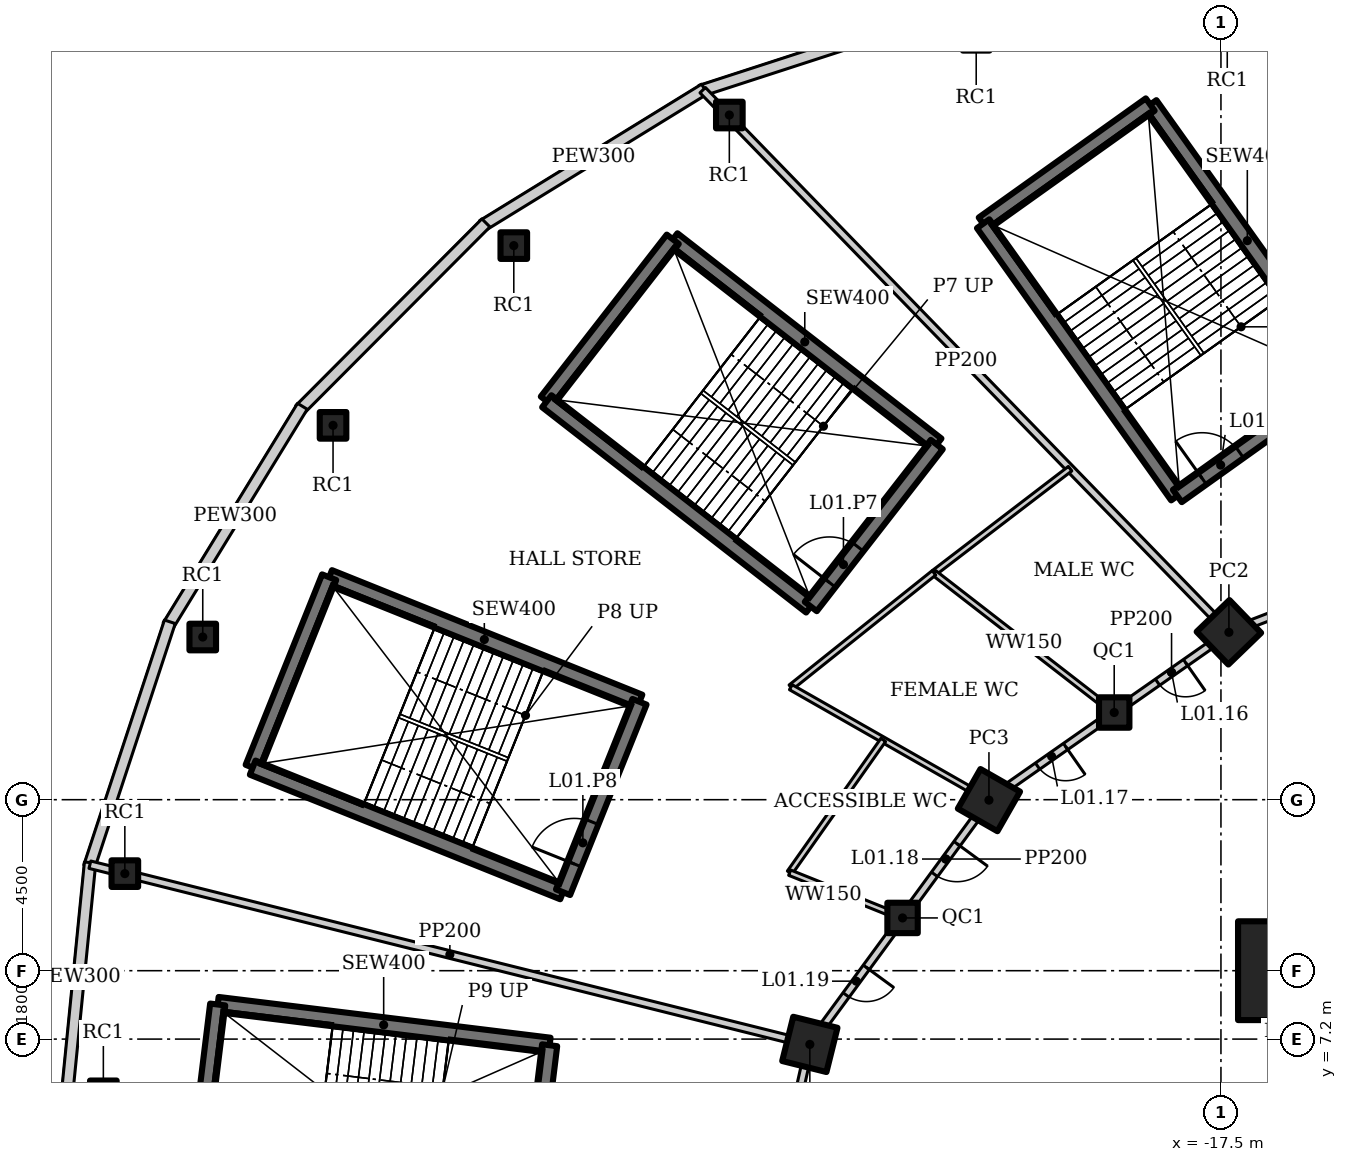
"""IFC4 building model, lengths in metres.
Left out: names, types, materials, properties, quantities, classifications, styles, units other than length and angle.
Written with IfcOpenShell. Run it as: python <this file> out.ifc"""

import sys

from ifc_helpers import new_model, si_unit, direction, frame, frame_2d, origin, origin_2d, place, context, subcontext, project, spatial, rectangle, hollow_rectangle, extrude, element, fill, save


model = new_model("IFC4")
c1 = context("Model", 3, precision=1e-05, world=origin(), true_north=direction((0.0, 1.0)))
c2 = subcontext(c1, "Body", "Model", "MODEL_VIEW")
j1 = project(units=[si_unit("LENGTHUNIT", "METRE"), si_unit("PLANEANGLEUNIT", "RADIAN")], contexts=[c1])
p1 = place(None, origin())
s1 = spatial("IfcSite", under=j1, at=p1, CompositionType="ELEMENT")
p2 = place(p1, origin())
s2 = spatial("IfcBuilding", under=s1, at=p2, CompositionType="ELEMENT")
p3 = place(p2, frame((0.0, 0.0, 6.5)))
s3 = spatial("IfcBuildingStorey", under=s2, at=p3, CompositionType="ELEMENT", Elevation=6.5)
p4 = place(p3, frame((-15.75, 9.0, 0.0), z_axis=(0.0, 0.0, 1.0), x_axis=(1.0, 0.0, 0.0)))
e1 = element("IfcColumn", 1, at=p4, inside=s3, PredefinedType="COLUMN", context=c2, shape_type="SweptSolid", body=[
    extrude(hollow_rectangle(XDim=2.6, YDim=2.6, WallThickness=0.13, at=origin_2d()), origin(), (0.0, 0.0, 1.0), 8.0),
])
p5 = place(p3, frame((-17.291, 17.905, 0.0), z_axis=(0.0, 0.0, 1.0), x_axis=(0.719339800339, 0.694658370459, 0.0)))
e2 = element("IfcColumn", 2, at=p5, inside=s3, PredefinedType="COLUMN", context=c2, shape_type="SweptSolid", body=[
    extrude(hollow_rectangle(XDim=1.2, YDim=1.2, WallThickness=0.1, at=origin_2d()), origin(), (0.0, 0.0, 1.0), 8.0),
])
p6 = place(p3, frame((-23.605, 13.489, 0.0), z_axis=(0.0, 0.0, 1.0), x_axis=(0.496139221777, 0.86824298017, 0.0)))
e3 = element("IfcColumn", 3, at=p6, inside=s3, PredefinedType="COLUMN", context=c2, shape_type="SweptSolid", body=[
    extrude(hollow_rectangle(XDim=1.2, YDim=1.2, WallThickness=0.12, at=origin_2d()), origin(), (0.0, 0.0, 1.0), 8.0),
])
p7 = place(p3, frame((-28.318, 7.06, 0.0), z_axis=(0.0, 0.0, 1.0), x_axis=(0.2419218956, 0.970295726276, 0.0)))
e4 = element("IfcColumn", 4, at=p7, inside=s3, PredefinedType="COLUMN", context=c2, shape_type="SweptSolid", body=[
    extrude(hollow_rectangle(XDim=1.2, YDim=1.2, WallThickness=0.1, at=origin_2d()), origin(), (0.0, 0.0, 1.0), 8.0),
])
for number, where, z_axis, x_axis in (
    (5, (-20.309, 15.794, 0.0), (0.0, 0.0, 1.0), (1.0, 0.0, 0.0)),
    (6, (-25.878, 10.388, 0.0), (0.0, 0.0, 1.0), (1.0, 0.0, 0.0)),
):
    element("IfcColumn", number, at=place(p3, frame(where, z_axis=z_axis, x_axis=x_axis)), inside=s3, PredefinedType="COLUMN", context=c2, shape_type="SweptSolid", body=[
        extrude(hollow_rectangle(XDim=0.8, YDim=0.8, WallThickness=0.05, at=origin_2d()), origin(), (0.0, 0.0, 1.0), 8.0),
    ])
for number, where, z_axis, x_axis in (
    (7, (-36.108, 28.081, 0.0), (0.0, 0.0, 1.0), (1.0, 0.0, 0.0)),
    (8, (-44.292, 17.781, 0.0), (0.0, 0.0, 1.0), (1.0, 0.0, 0.0)),
    (9, (-46.908, 5.76, 0.0), (0.0, 0.0, 1.0), (1.0, 0.0, 0.0)),
    (10, (-30.436, 31.518, 0.0), (0.0, 0.0, 1.0), (1.0, 0.0, 0.0)),
    (11, (-40.864, 23.351, 0.0), (0.0, 0.0, 1.0), (1.0, 0.0, 0.0)),
    (12, (-46.343, 11.554, 0.0), (0.0, 0.0, 1.0), (1.0, 0.0, 0.0)),
):
    element("IfcColumn", number, at=place(p3, frame(where, z_axis=z_axis, x_axis=x_axis)), inside=s3, PredefinedType="COLUMN", context=c2, shape_type="SweptSolid", body=[
        extrude(hollow_rectangle(XDim=0.7, YDim=0.7, WallThickness=0.04, at=origin_2d()), origin(), (0.0, 0.0, 1.0), 8.0),
    ])
p8 = place(p3, frame((-24.495, 34.328, 0.0), z_axis=(0.0, 0.0, 1.0), x_axis=(-0.951140010357, -0.308759907853, 0.0)))
e13 = element("IfcWall", 13, at=p8, inside=s3, PredefinedType="SOLIDWALL", context=c2, shape_type="SweptSolid", body=[
    extrude(rectangle(XDim=7.041, YDim=0.3, at=frame_2d((3.521, 0.0))), origin(), (0.0, 0.0, 1.0), 7.8),
])
p9 = place(p3, frame((-31.088, 32.202, 0.0), z_axis=(0.0, 0.0, 1.0), x_axis=(-0.851808565246, -0.52385319334, 0.0)))
e14 = element("IfcWall", 14, at=p9, inside=s3, PredefinedType="SOLIDWALL", context=c2, shape_type="SweptSolid", body=[
    extrude(rectangle(XDim=6.861, YDim=0.3, at=frame_2d((3.43, 0.0))), origin(), (0.0, 0.0, 1.0), 7.8),
])
p10 = place(p3, frame((-36.842, 28.679, 0.0), z_axis=(0.0, 0.0, 1.0), x_axis=(-0.705874614645, -0.708336804352, 0.0)))
e15 = element("IfcWall", 15, at=p10, inside=s3, PredefinedType="SOLIDWALL", context=c2, shape_type="SweptSolid", body=[
    extrude(rectangle(XDim=6.941, YDim=0.3, at=frame_2d((3.47, 0.0))), origin(), (0.0, 0.0, 1.0), 7.8),
])
p11 = place(p3, frame((-41.67, 23.852, 0.0), z_axis=(0.0, 0.0, 1.0), x_axis=(-0.52225340952, -0.852790347181, 0.0)))
e16 = element("IfcWall", 16, at=p11, inside=s3, PredefinedType="SOLIDWALL", context=c2, shape_type="SweptSolid", body=[
    extrude(rectangle(XDim=6.771, YDim=0.3, at=frame_2d((3.385, 0.0))), origin(), (0.0, 0.0, 1.0), 7.8),
])
p12 = place(p3, frame((-45.158, 18.182, 0.0), z_axis=(0.0, 0.0, 1.0), x_axis=(-0.31263149373, -0.94987449125, 0.0)))
e17 = element("IfcWall", 17, at=p12, inside=s3, PredefinedType="SOLIDWALL", context=c2, shape_type="SweptSolid", body=[
    extrude(rectangle(XDim=6.786, YDim=0.3, at=frame_2d((3.393, 0.0))), origin(), (0.0, 0.0, 1.0), 7.8),
])
p13 = place(p3, frame((-47.257, 11.845, 0.0), z_axis=(0.0, 0.0, 1.0), x_axis=(-0.099051198898, -0.9950823383, 0.0)))
e18 = element("IfcWall", 18, at=p13, inside=s3, PredefinedType="SOLIDWALL", context=c2, shape_type="SweptSolid", body=[
    extrude(rectangle(XDim=6.036, YDim=0.3, at=frame_2d((3.018, 0.0))), origin(), (0.0, 0.0, 1.0), 7.8),
])
p14 = place(p3, frame((-13.745, 19.27, 0.0), z_axis=(0.0, 0.0, 1.0), x_axis=(-0.933224646415, -0.359293416754, 0.0)))
e19 = element("IfcWall", 19, at=p14, inside=s3, PredefinedType="SOLIDWALL", context=c2, shape_type="SweptSolid", body=[
    extrude(rectangle(XDim=3.799, YDim=0.2, at=frame_2d((1.899, 0.0))), origin(), (0.0, 0.0, 1.0), 7.274),
])
p15 = place(p3, frame((-17.291, 17.905, 0.0), z_axis=(0.0, 0.0, 1.0), x_axis=(-0.819409395821, -0.573208724672, 0.0)))
e20 = element("IfcWall", 20, at=p15, inside=s3, PredefinedType="SOLIDWALL", context=c2, shape_type="SweptSolid", body=[
    extrude(rectangle(XDim=3.683, YDim=0.2, at=frame_2d((1.841, 0.0))), origin(), (0.0, 0.0, 1.0), 7.396),
])
p16 = place(p15, frame((1.391, 0.0, 0.0)))
e21 = element("IfcOpeningElement", 21, at=p16, cuts=e20, PredefinedType="OPENING", context=c2, shape_type="SweptSolid", body=[
    extrude(rectangle(XDim=0.9, YDim=2.1, at=frame_2d((0.45, 1.05))), frame((0.0, 0.11, 0.0), z_axis=(0.0, -1.0, 0.0), x_axis=(1.0, 0.0, 0.0)), (0.0, 0.0, 1.0), 0.22),
])
p17 = place(p3, frame((-20.309, 15.794, 0.0), z_axis=(0.0, 0.0, 1.0), x_axis=(-0.819442856133, -0.573160889744, 0.0)))
e22 = element("IfcWall", 22, at=p17, inside=s3, PredefinedType="SOLIDWALL", context=c2, shape_type="SweptSolid", body=[
    extrude(rectangle(XDim=4.023, YDim=0.2, at=frame_2d((2.011, 0.0))), origin(), (0.0, 0.0, 1.0), 7.396),
])
p18 = place(p17, frame((1.561, 0.0, 0.0)))
e23 = element("IfcOpeningElement", 23, at=p18, cuts=e22, PredefinedType="OPENING", context=c2, shape_type="SweptSolid", body=[
    extrude(rectangle(XDim=0.9, YDim=2.1, at=frame_2d((0.45, 1.05))), frame((0.0, 0.11, 0.0), z_axis=(0.0, -1.0, 0.0), x_axis=(1.0, 0.0, 0.0)), (0.0, 0.0, 1.0), 0.22),
])
p19 = place(p3, frame((-23.605, 13.489, 0.0), z_axis=(0.0, 0.0, 1.0), x_axis=(-0.591286566758, -0.806461527893, 0.0)))
e24 = element("IfcWall", 24, at=p19, inside=s3, PredefinedType="SOLIDWALL", context=c2, shape_type="SweptSolid", body=[
    extrude(rectangle(XDim=3.844, YDim=0.2, at=frame_2d((1.922, 0.0))), origin(), (0.0, 0.0, 1.0), 7.396),
])
p20 = place(p19, frame((1.422, 0.0, 0.0)))
e25 = element("IfcOpeningElement", 25, at=p20, cuts=e24, PredefinedType="OPENING", context=c2, shape_type="SweptSolid", body=[
    extrude(rectangle(XDim=1.0, YDim=2.1, at=frame_2d((0.5, 1.05))), frame((0.0, 0.11, 0.0), z_axis=(0.0, -1.0, 0.0), x_axis=(1.0, 0.0, 0.0)), (0.0, 0.0, 1.0), 0.22),
])
p21 = place(p3, frame((-25.878, 10.388, 0.0), z_axis=(0.0, 0.0, 1.0), x_axis=(-0.591255937291, -0.806483984105, 0.0)))
e26 = element("IfcWall", 26, at=p21, inside=s3, PredefinedType="SOLIDWALL", context=c2, shape_type="SweptSolid", body=[
    extrude(rectangle(XDim=4.127, YDim=0.2, at=frame_2d((2.063, 0.0))), origin(), (0.0, 0.0, 1.0), 7.396),
])
p22 = place(p21, frame((1.613, 0.0, 0.0)))
e27 = element("IfcOpeningElement", 27, at=p22, cuts=e26, PredefinedType="OPENING", context=c2, shape_type="SweptSolid", body=[
    extrude(rectangle(XDim=0.9, YDim=2.1, at=frame_2d((0.45, 1.05))), frame((0.0, 0.11, 0.0), z_axis=(0.0, -1.0, 0.0), x_axis=(1.0, 0.0, 0.0)), (0.0, 0.0, 1.0), 0.22),
])
p23 = place(p3, frame((-28.318, 7.06, 0.0), z_axis=(0.0, 0.0, 1.0), x_axis=(-0.218673326171, -0.97579812278, 0.0)))
e28 = element("IfcWall", 28, at=p23, inside=s3, PredefinedType="SOLIDWALL", context=c2, shape_type="SweptSolid", body=[
    extrude(rectangle(XDim=3.574, YDim=0.2, at=frame_2d((1.787, 0.0))), origin(), (0.0, 0.0, 1.0), 7.396),
])
p24 = place(p3, frame((-17.291, 17.905, 0.0), z_axis=(0.0, 0.0, 1.0), x_axis=(-0.696460684513, 0.717594951855, 0.0)))
e29 = element("IfcWall", 29, at=p24, inside=s3, PredefinedType="SOLIDWALL", context=c2, shape_type="SweptSolid", body=[
    extrude(rectangle(XDim=19.881, YDim=0.2, at=frame_2d((9.94, 0.0))), origin(), (0.0, 0.0, 1.0), 6.3),
])
p25 = place(p3, frame((-28.318, 7.06, 0.0), z_axis=(0.0, 0.0, 1.0), x_axis=(-0.970227758662, 0.242194335859, 0.0)))
e30 = element("IfcWall", 30, at=p25, inside=s3, PredefinedType="SOLIDWALL", context=c2, shape_type="SweptSolid", body=[
    extrude(rectangle(XDim=19.526, YDim=0.2, at=frame_2d((9.763, 0.0))), origin(), (0.0, 0.0, 1.0), 6.3),
])
p26 = place(p3, frame((-21.469, 22.211, 0.0), z_axis=(0.0, 0.0, 1.0), x_axis=(-0.794122703503, -0.607757461313, 0.0)))
e31 = element("IfcWall", 31, at=p26, inside=s3, PredefinedType="SOLIDWALL", context=c2, shape_type="SweptSolid", body=[
    extrude(rectangle(XDim=4.51, YDim=0.15, at=frame_2d((2.255, 0.0))), origin(), (0.0, 0.0, 1.0), 7.8),
])
p27 = place(p3, frame((-20.309, 15.794, 0.0), z_axis=(0.0, 0.0, 1.0), x_axis=(-0.790437708207, 0.61254243073, 0.0)))
e32 = element("IfcWall", 32, at=p27, inside=s3, PredefinedType="SOLIDWALL", context=c2, shape_type="SweptSolid", body=[
    extrude(rectangle(XDim=6.0, YDim=0.15, at=frame_2d((3.0, 0.0))), origin(), (0.0, 0.0, 1.0), 7.8),
])
p28 = place(p3, frame((-25.051, 19.469, 0.0), z_axis=(0.0, 0.0, 1.0), x_axis=(-0.781204641684, -0.624275025779, 0.0)))
e33 = element("IfcWall", 33, at=p28, inside=s3, PredefinedType="SOLIDWALL", context=c2, shape_type="SweptSolid", body=[
    extrude(rectangle(XDim=4.821, YDim=0.15, at=frame_2d((2.411, 0.0))), origin(), (0.0, 0.0, 1.0), 7.8),
])
p29 = place(p3, frame((-23.605, 13.489, 0.0), z_axis=(0.0, 0.0, 1.0), x_axis=(-0.868778495598, 0.49520089417, 0.0)))
e34 = element("IfcWall", 34, at=p29, inside=s3, PredefinedType="SOLIDWALL", context=c2, shape_type="SweptSolid", body=[
    extrude(rectangle(XDim=6.0, YDim=0.15, at=frame_2d((3.0, 0.0))), origin(), (0.0, 0.0, 1.0), 6.3),
])
p30 = place(p3, frame((-26.385, 15.073, 0.0), z_axis=(0.0, 0.0, 1.0), x_axis=(-0.576153892924, -0.81734123331, 0.0)))
e35 = element("IfcWall", 35, at=p30, inside=s3, PredefinedType="SOLIDWALL", context=c2, shape_type="SweptSolid", body=[
    extrude(rectangle(XDim=4.275, YDim=0.15, at=frame_2d((2.137, 0.0))), origin(), (0.0, 0.0, 1.0), 7.8),
])
p31 = place(p3, frame((-25.878, 10.388, 0.0), z_axis=(0.0, 0.0, 1.0), x_axis=(-0.928160641083, 0.372179827966, 0.0)))
e36 = element("IfcWall", 36, at=p31, inside=s3, PredefinedType="SOLIDWALL", context=c2, shape_type="SweptSolid", body=[
    extrude(rectangle(XDim=3.2, YDim=0.15, at=frame_2d((1.6, 0.0))), origin(), (0.0, 0.0, 1.0), 7.8),
])
p32 = place(p3, frame((-14.251, 24.629, 0.0), z_axis=(0.0, 0.0, 1.0), x_axis=(-0.580705313356, 0.814113836659, 0.0)))
e37 = element("IfcWall", 37, at=p32, inside=s3, PredefinedType="SHEAR", context=c2, shape_type="SweptSolid", body=[
    extrude(rectangle(XDim=8.8, YDim=0.4, at=frame_2d((4.4, 0.0))), origin(), (0.0, 0.0, 1.0), 8.0),
])
p33 = place(p3, frame((-19.361, 31.793, 0.0), z_axis=(0.0, 0.0, 1.0), x_axis=(-0.814121252423, -0.580694916762, 0.0)))
e38 = element("IfcWall", 38, at=p33, inside=s3, PredefinedType="SHEAR", context=c2, shape_type="SweptSolid", body=[
    extrude(rectangle(XDim=5.4, YDim=0.4, at=frame_2d((2.7, 0.0))), origin(), (0.0, 0.0, 1.0), 8.0),
])
p34 = place(p3, frame((-23.757, 28.657, 0.0), z_axis=(0.0, 0.0, 1.0), x_axis=(0.580705313356, -0.814113836659, 0.0)))
e39 = element("IfcWall", 39, at=p34, inside=s3, PredefinedType="SHEAR", context=c2, shape_type="SweptSolid", body=[
    extrude(rectangle(XDim=8.8, YDim=0.4, at=frame_2d((4.4, 0.0))), origin(), (0.0, 0.0, 1.0), 8.0),
])
p35 = place(p3, frame((-18.647, 21.493, 0.0), z_axis=(0.0, 0.0, 1.0), x_axis=(0.814121252423, 0.580694916762, 0.0)))
e40 = element("IfcWall", 40, at=p35, inside=s3, PredefinedType="SHEAR", context=c2, shape_type="SweptSolid", body=[
    extrude(rectangle(XDim=5.4, YDim=0.4, at=frame_2d((2.7, 0.0))), origin(), (0.0, 0.0, 1.0), 8.0),
])
p36 = place(p35, frame((0.8, 0.0, 0.0)))
e41 = element("IfcOpeningElement", 41, at=p36, cuts=e40, PredefinedType="OPENING", context=c2, shape_type="SweptSolid", body=[
    extrude(rectangle(XDim=1.2, YDim=2.1, at=frame_2d((0.6, 1.05))), frame((0.0, 0.21, 0.0), z_axis=(0.0, -1.0, 0.0), x_axis=(1.0, 0.0, 0.0)), (0.0, 0.0, 1.0), 0.42),
])
p37 = place(p3, frame((-24.978, 22.846, 0.0), z_axis=(0.0, 0.0, 1.0), x_axis=(-0.78938060008, 0.613904119726, 0.0)))
e42 = element("IfcWall", 42, at=p37, inside=s3, PredefinedType="SHEAR", context=c2, shape_type="SweptSolid", body=[
    extrude(rectangle(XDim=8.8, YDim=0.4, at=frame_2d((4.4, 0.0))), origin(), (0.0, 0.0, 1.0), 8.0),
])
p38 = place(p3, frame((-31.924, 28.248, 0.0), z_axis=(0.0, 0.0, 1.0), x_axis=(-0.613912443548, -0.789374126544, 0.0)))
e43 = element("IfcWall", 43, at=p38, inside=s3, PredefinedType="SHEAR", context=c2, shape_type="SweptSolid", body=[
    extrude(rectangle(XDim=5.4, YDim=0.4, at=frame_2d((2.7, 0.0))), origin(), (0.0, 0.0, 1.0), 8.0),
])
p39 = place(p3, frame((-35.239, 23.985, 0.0), z_axis=(0.0, 0.0, 1.0), x_axis=(0.78938060008, -0.613904119726, 0.0)))
e44 = element("IfcWall", 44, at=p39, inside=s3, PredefinedType="SHEAR", context=c2, shape_type="SweptSolid", body=[
    extrude(rectangle(XDim=8.8, YDim=0.4, at=frame_2d((4.4, 0.0))), origin(), (0.0, 0.0, 1.0), 8.0),
])
p40 = place(p3, frame((-28.293, 18.583, 0.0), z_axis=(0.0, 0.0, 1.0), x_axis=(0.613912443548, 0.789374126544, 0.0)))
e45 = element("IfcWall", 45, at=p40, inside=s3, PredefinedType="SHEAR", context=c2, shape_type="SweptSolid", body=[
    extrude(rectangle(XDim=5.4, YDim=0.4, at=frame_2d((2.7, 0.0))), origin(), (0.0, 0.0, 1.0), 8.0),
])
p41 = place(p40, frame((0.8, 0.0, 0.0)))
e46 = element("IfcOpeningElement", 46, at=p41, cuts=e45, PredefinedType="OPENING", context=c2, shape_type="SweptSolid", body=[
    extrude(rectangle(XDim=1.2, YDim=2.1, at=frame_2d((0.6, 1.05))), frame((0.0, 0.21, 0.0), z_axis=(0.0, -1.0, 0.0), x_axis=(1.0, 0.0, 0.0)), (0.0, 0.0, 1.0), 0.42),
])
p42 = place(p3, frame((-32.8, 16.077, 0.0), z_axis=(0.0, 0.0, 1.0), x_axis=(-0.92801678004, 0.372538395288, 0.0)))
e47 = element("IfcWall", 47, at=p42, inside=s3, PredefinedType="SHEAR", context=c2, shape_type="SweptSolid", body=[
    extrude(rectangle(XDim=8.8, YDim=0.4, at=frame_2d((4.4, 0.0))), origin(), (0.0, 0.0, 1.0), 8.0),
])
p43 = place(p3, frame((-40.967, 19.355, 0.0), z_axis=(0.0, 0.0, 1.0), x_axis=(-0.372544066459, -0.928014503414, 0.0)))
e48 = element("IfcWall", 48, at=p43, inside=s3, PredefinedType="SHEAR", context=c2, shape_type="SweptSolid", body=[
    extrude(rectangle(XDim=5.4, YDim=0.4, at=frame_2d((2.7, 0.0))), origin(), (0.0, 0.0, 1.0), 8.0),
])
p44 = place(p3, frame((-42.978, 14.344, 0.0), z_axis=(0.0, 0.0, 1.0), x_axis=(0.92801678004, -0.372538395288, 0.0)))
e49 = element("IfcWall", 49, at=p44, inside=s3, PredefinedType="SHEAR", context=c2, shape_type="SweptSolid", body=[
    extrude(rectangle(XDim=8.8, YDim=0.4, at=frame_2d((4.4, 0.0))), origin(), (0.0, 0.0, 1.0), 8.0),
])
p45 = place(p3, frame((-34.812, 11.065, 0.0), z_axis=(0.0, 0.0, 1.0), x_axis=(0.372544066459, 0.928014503414, 0.0)))
e50 = element("IfcWall", 50, at=p45, inside=s3, PredefinedType="SHEAR", context=c2, shape_type="SweptSolid", body=[
    extrude(rectangle(XDim=5.4, YDim=0.4, at=frame_2d((2.7, 0.0))), origin(), (0.0, 0.0, 1.0), 8.0),
])
p46 = place(p45, frame((0.8, 0.0, 0.0)))
e51 = element("IfcOpeningElement", 51, at=p46, cuts=e50, PredefinedType="OPENING", context=c2, shape_type="SweptSolid", body=[
    extrude(rectangle(XDim=1.2, YDim=2.1, at=frame_2d((0.6, 1.05))), frame((0.0, 0.21, 0.0), z_axis=(0.0, -1.0, 0.0), x_axis=(1.0, 0.0, 0.0)), (0.0, 0.0, 1.0), 0.42),
])
p47 = place(p3, frame((-35.165, 7.038, 0.0), z_axis=(0.0, 0.0, 1.0), x_axis=(-0.992545280606, 0.121876437212, 0.0)))
e52 = element("IfcWall", 52, at=p47, inside=s3, PredefinedType="SHEAR", context=c2, shape_type="SweptSolid", body=[
    extrude(rectangle(XDim=8.8, YDim=0.4, at=frame_2d((4.4, 0.0))), origin(), (0.0, 0.0, 1.0), 8.0),
])
p48 = place(p3, frame((-43.899, 8.11, 0.0), z_axis=(0.0, 0.0, 1.0), x_axis=(-0.12184754212, -0.99254882826, 0.0)))
e53 = element("IfcWall", 53, at=p48, inside=s3, PredefinedType="SHEAR", context=c2, shape_type="SweptSolid", body=[
    extrude(rectangle(XDim=5.4, YDim=0.4, at=frame_2d((2.7, 0.0))), origin(), (0.0, 0.0, 1.0), 8.0),
])
p49 = place(p3, frame((-35.823, 1.678, 0.0), z_axis=(0.0, 0.0, 1.0), x_axis=(0.12184754212, 0.99254882826, 0.0)))
e54 = element("IfcWall", 54, at=p49, inside=s3, PredefinedType="SHEAR", context=c2, shape_type="SweptSolid", body=[
    extrude(rectangle(XDim=5.4, YDim=0.4, at=frame_2d((2.7, 0.0))), origin(), (0.0, 0.0, 1.0), 8.0),
])
p50 = place(p49, frame((0.8, 0.0, 0.0)))
e55 = element("IfcOpeningElement", 55, at=p50, cuts=e54, PredefinedType="OPENING", context=c2, shape_type="SweptSolid", body=[
    extrude(rectangle(XDim=1.2, YDim=2.1, at=frame_2d((0.6, 1.05))), frame((0.0, 0.21, 0.0), z_axis=(0.0, -1.0, 0.0), x_axis=(1.0, 0.0, 0.0)), (0.0, 0.0, 1.0), 0.42),
])
p51 = place(p16, origin())
e56 = element("IfcDoor", 56, at=p51, inside=s3, OperationType="SINGLE_SWING_LEFT", PredefinedType="DOOR", context=c2, shape_type="SweptSolid", body=[
    extrude(rectangle(XDim=0.9, YDim=2.1, at=frame_2d((0.45, 1.05))), frame((0.0, 0.025, 0.0), z_axis=(0.0, -1.0, 0.0), x_axis=(1.0, 0.0, 0.0)), (0.0, 0.0, 1.0), 0.05),
])
fill(e21, e56)
p52 = place(p18, origin())
e57 = element("IfcDoor", 57, at=p52, inside=s3, OperationType="SINGLE_SWING_LEFT", PredefinedType="DOOR", context=c2, shape_type="SweptSolid", body=[
    extrude(rectangle(XDim=0.9, YDim=2.1, at=frame_2d((0.45, 1.05))), frame((0.0, 0.025, 0.0), z_axis=(0.0, -1.0, 0.0), x_axis=(1.0, 0.0, 0.0)), (0.0, 0.0, 1.0), 0.05),
])
fill(e23, e57)
p53 = place(p20, origin())
e58 = element("IfcDoor", 58, at=p53, inside=s3, OperationType="SINGLE_SWING_LEFT", PredefinedType="DOOR", context=c2, shape_type="SweptSolid", body=[
    extrude(rectangle(XDim=1.0, YDim=2.1, at=frame_2d((0.5, 1.05))), frame((0.0, 0.025, 0.0), z_axis=(0.0, -1.0, 0.0), x_axis=(1.0, 0.0, 0.0)), (0.0, 0.0, 1.0), 0.05),
])
fill(e25, e58)
p54 = place(p22, origin())
e59 = element("IfcDoor", 59, at=p54, inside=s3, OperationType="SINGLE_SWING_LEFT", PredefinedType="DOOR", context=c2, shape_type="SweptSolid", body=[
    extrude(rectangle(XDim=0.9, YDim=2.1, at=frame_2d((0.45, 1.05))), frame((0.0, 0.025, 0.0), z_axis=(0.0, -1.0, 0.0), x_axis=(1.0, 0.0, 0.0)), (0.0, 0.0, 1.0), 0.05),
])
fill(e27, e59)
p55 = place(p36, origin())
e60 = element("IfcDoor", 60, at=p55, inside=s3, OperationType="SINGLE_SWING_RIGHT", PredefinedType="DOOR", context=c2, shape_type="SweptSolid", body=[
    extrude(rectangle(XDim=1.2, YDim=2.1, at=frame_2d((0.6, 1.05))), frame((0.0, 0.025, 0.0), z_axis=(0.0, -1.0, 0.0), x_axis=(1.0, 0.0, 0.0)), (0.0, 0.0, 1.0), 0.05),
])
fill(e41, e60)
p56 = place(p41, origin())
e61 = element("IfcDoor", 61, at=p56, inside=s3, OperationType="SINGLE_SWING_RIGHT", PredefinedType="DOOR", context=c2, shape_type="SweptSolid", body=[
    extrude(rectangle(XDim=1.2, YDim=2.1, at=frame_2d((0.6, 1.05))), frame((0.0, 0.025, 0.0), z_axis=(0.0, -1.0, 0.0), x_axis=(1.0, 0.0, 0.0)), (0.0, 0.0, 1.0), 0.05),
])
fill(e46, e61)
p57 = place(p46, origin())
e62 = element("IfcDoor", 62, at=p57, inside=s3, OperationType="SINGLE_SWING_RIGHT", PredefinedType="DOOR", context=c2, shape_type="SweptSolid", body=[
    extrude(rectangle(XDim=1.2, YDim=2.1, at=frame_2d((0.6, 1.05))), frame((0.0, 0.025, 0.0), z_axis=(0.0, -1.0, 0.0), x_axis=(1.0, 0.0, 0.0)), (0.0, 0.0, 1.0), 0.05),
])
fill(e51, e62)
save(model, sys.argv[1])
